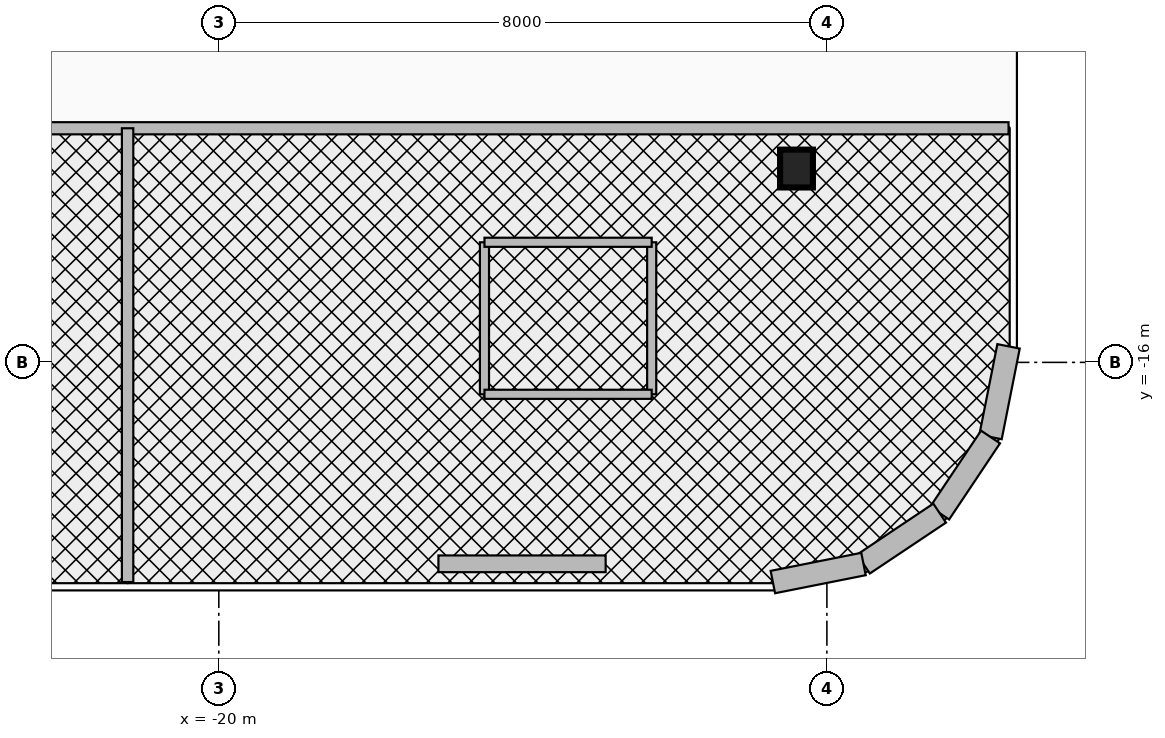
"""IFC4 building model, lengths in metres.
Left out: names, types, materials, properties, quantities, classifications, styles, units other than length and angle.
Written with IfcOpenShell. Run it as: python <this file> out.ifc"""

import sys

from ifc_helpers import new_model, si_unit, direction, frame, frame_2d, origin, origin_2d, place, context, subcontext, project, spatial, rectangle, i_section, extrude, source, transform, mapped, element, fill, save


model = new_model("IFC4")
c1 = context("Model", 3, precision=1e-05, world=origin(), true_north=direction((0.0, 1.0)))
c2 = subcontext(c1, "Body", "Model", "MODEL_VIEW")
j1 = project(units=[si_unit("LENGTHUNIT", "METRE"), si_unit("PLANEANGLEUNIT", "RADIAN")], contexts=[c1])
p1 = place(None, origin())
s1 = spatial("IfcSite", under=j1, at=p1, CompositionType="ELEMENT")
p2 = place(p1, origin())
s2 = spatial("IfcBuilding", under=s1, at=p2, CompositionType="ELEMENT")
p3 = place(p2, frame((0.0, 0.0, 26.0)))
s3 = spatial("IfcBuildingStorey", under=s2, at=p3, CompositionType="ELEMENT", Elevation=26.0)
m1 = source(origin(), c2, "Body", "SweptSolid", [
    extrude(i_section(OverallWidth=0.432, OverallDepth=0.498, WebThickness=0.056, FlangeThickness=0.089, at=origin_2d()), origin(), (0.0, 0.0, 1.0), 3.7),
])
p4 = place(p3, frame((-12.4, -13.45, 0.0), z_axis=(0.0, 0.0, 1.0), x_axis=(1.0, 0.0, 0.0)))
e1 = element("IfcColumn", 1, at=p4, inside=s3, PredefinedType="COLUMN", context=c2, shape_type="MappedRepresentation", body=[
    mapped(m1, transform((0.0, 0.0, 0.0), x_axis=(1.0, 0.0, 0.0), y_axis=(0.0, 1.0, 0.0), z_axis=(0.0, 0.0, 1.0), scale=1.0)),
])
p5 = place(p3, frame((-9.61, -15.789, 0.0), z_axis=(0.0, 0.0, 1.0), x_axis=(-0.194996050505, -0.980804027463, 0.0)))
e2 = element("IfcWall", 2, at=p5, inside=s3, PredefinedType="SOLIDWALL", context=c2, shape_type="SweptSolid", body=[
    extrude(rectangle(XDim=1.216, YDim=0.3, at=frame_2d((0.608, 0.0))), origin(), (0.0, 0.0, 1.0), 3.46),
])
for number, where, z_axis, x_axis in (
    (3, (-9.847, -16.982, 0.0), (0.0, 0.0, 1.0), (-0.556, -0.831, 0.0)),
    (4, (-10.517, -17.983, 0.0), (0.0, 0.0, 1.0), (-0.831, -0.556, 0.0)),
):
    element("IfcWall", number, at=place(p3, frame(where, z_axis=z_axis, x_axis=x_axis)), inside=s3, PredefinedType="SOLIDWALL", context=c2, shape_type="SweptSolid", body=[
        extrude(rectangle(XDim=1.205, YDim=0.3, at=frame_2d((0.603, 0.0))), origin(), (0.0, 0.0, 1.0), 3.46),
    ])
p6 = place(p3, frame((-11.518, -18.653, 0.0), z_axis=(0.0, 0.0, 1.0), x_axis=(-0.980804027463, -0.194996050505, 0.0)))
e5 = element("IfcWall", 5, at=p6, inside=s3, PredefinedType="SOLIDWALL", context=c2, shape_type="SweptSolid", body=[
    extrude(rectangle(XDim=1.216, YDim=0.3, at=frame_2d((0.608, 0.0))), origin(), (0.0, 0.0, 1.0), 3.46),
])
p7 = place(p3, frame((-14.911, -18.65, 0.0), z_axis=(0.0, 0.0, 1.0), x_axis=(-1.0, 0.0, 0.0)))
e6 = element("IfcWall", 6, at=p7, inside=s3, PredefinedType="SOLIDWALL", context=c2, shape_type="SweptSolid", body=[
    extrude(rectangle(XDim=2.2, YDim=0.22, at=frame_2d((1.1, 0.0))), origin(), (0.0, 0.0, 1.0), 3.46),
])
p8 = place(p7, frame((0.65, 0.0, 0.95)))
e7 = element("IfcOpeningElement", 7, at=p8, cuts=e6, PredefinedType="OPENING", context=c2, shape_type="SweptSolid", body=[
    extrude(rectangle(XDim=0.9, YDim=1.3, at=frame_2d((0.45, 0.65))), frame((0.0, 0.125, 0.0), z_axis=(0.0, -1.0, 0.0), x_axis=(1.0, 0.0, 0.0)), (0.0, 0.0, 1.0), 0.25),
])
p9 = place(p3, frame((-31.89, -12.92, 0.0), z_axis=(0.0, 0.0, 1.0), x_axis=(1.0, 0.0, 0.0)))
e8 = element("IfcWall", 8, at=p9, inside=s3, PredefinedType="PARTITIONING", context=c2, shape_type="SweptSolid", body=[
    extrude(rectangle(XDim=22.28, YDim=0.16, at=frame_2d((11.14, 0.0))), origin(), (0.0, 0.0, 1.0), 2.834),
])
p10 = place(p9, frame((5.97, 0.0, 0.0)))
e9 = element("IfcOpeningElement", 9, at=p10, cuts=e8, PredefinedType="OPENING", context=c2, shape_type="SweptSolid", body=[
    extrude(rectangle(XDim=0.95, YDim=2.15, at=frame_2d((0.475, 1.075))), frame((0.0, 0.095, 0.0), z_axis=(0.0, -1.0, 0.0), x_axis=(1.0, 0.0, 0.0)), (0.0, 0.0, 1.0), 0.19),
])
p11 = place(p9, frame((16.01, 0.0, 0.0)))
e10 = element("IfcOpeningElement", 10, at=p11, cuts=e8, PredefinedType="OPENING", context=c2, shape_type="SweptSolid", body=[
    extrude(rectangle(XDim=0.95, YDim=2.15, at=frame_2d((0.475, 1.075))), frame((0.0, 0.095, 0.0), z_axis=(0.0, -1.0, 0.0), x_axis=(1.0, 0.0, 0.0)), (0.0, 0.0, 1.0), 0.19),
])
p12 = place(p3, frame((-21.2, -18.89, 0.0), z_axis=(0.0, 0.0, 1.0), x_axis=(0.0, 1.0, 0.0)))
e11 = element("IfcWall", 11, at=p12, inside=s3, PredefinedType="PARTITIONING", context=c2, shape_type="SweptSolid", body=[
    extrude(rectangle(XDim=5.97, YDim=0.15, at=frame_2d((2.985, 0.0))), origin(), (0.0, 0.0, 1.0), 2.896),
])
for number, where, z_axis, x_axis in (
    (12, (-16.505, -16.42, 0.0), (0.0, 0.0, 1.0), (0.0, 1.0, 0.0)),
    (13, (-14.305, -16.42, 0.0), (0.0, 0.0, 1.0), (0.0, 1.0, 0.0)),
):
    element("IfcWall", number, at=place(p3, frame(where, z_axis=z_axis, x_axis=x_axis)), inside=s3, PredefinedType="PARTITIONING", context=c2, shape_type="SweptSolid", body=[
        extrude(rectangle(XDim=2.0, YDim=0.12, at=frame_2d((1.0, 0.0))), origin(), (0.0, 0.0, 1.0), 3.46),
    ])
p13 = place(p3, frame((-16.505, -16.42, 0.0), z_axis=(0.0, 0.0, 1.0), x_axis=(1.0, 0.0, 0.0)))
e14 = element("IfcWall", 14, at=p13, inside=s3, PredefinedType="PARTITIONING", context=c2, shape_type="SweptSolid", body=[
    extrude(rectangle(XDim=2.2, YDim=0.12, at=frame_2d((1.1, 0.0))), origin(), (0.0, 0.0, 1.0), 3.46),
])
p14 = place(p3, frame((-16.505, -14.42, 0.0), z_axis=(0.0, 0.0, 1.0), x_axis=(1.0, 0.0, 0.0)))
e15 = element("IfcWall", 15, at=p14, inside=s3, PredefinedType="PARTITIONING", context=c2, shape_type="SweptSolid", body=[
    extrude(rectangle(XDim=2.2, YDim=0.12, at=frame_2d((1.1, 0.0))), origin(), (0.0, 0.0, 1.0), 3.46),
])
p15 = place(p14, frame((0.675, 0.0, 0.0)))
e16 = element("IfcOpeningElement", 16, at=p15, cuts=e15, PredefinedType="OPENING", context=c2, shape_type="SweptSolid", body=[
    extrude(rectangle(XDim=0.85, YDim=2.1, at=frame_2d((0.425, 1.05))), frame((0.0, 0.075, 0.0), z_axis=(0.0, -1.0, 0.0), x_axis=(1.0, 0.0, 0.0)), (0.0, 0.0, 1.0), 0.15),
])
p16 = place(p8, origin())
e17 = element("IfcWindow", 17, at=p16, inside=s3, PartitioningType="SINGLE_PANEL", PredefinedType="WINDOW", context=c2, shape_type="SweptSolid", body=[
    extrude(rectangle(XDim=0.9, YDim=1.3, at=frame_2d((0.45, 0.65))), frame((0.0, 0.03, 0.0), z_axis=(0.0, -1.0, 0.0), x_axis=(1.0, 0.0, 0.0)), (0.0, 0.0, 1.0), 0.06),
])
fill(e7, e17)
p17 = place(p11, frame((0.95, 0.0, 0.0), z_axis=(0.0, 0.0, 1.0), x_axis=(-1.0, 0.0, 0.0)))
e18 = element("IfcDoor", 18, at=p17, inside=s3, OperationType="SINGLE_SWING_LEFT", PredefinedType="DOOR", context=c2, shape_type="SweptSolid", body=[
    extrude(rectangle(XDim=0.95, YDim=2.15, at=frame_2d((0.475, 1.075))), frame((0.0, 0.025, 0.0), z_axis=(0.0, -1.0, 0.0), x_axis=(1.0, 0.0, 0.0)), (0.0, 0.0, 1.0), 0.05),
])
fill(e10, e18)
p18 = place(p15, origin())
e19 = element("IfcDoor", 19, at=p18, inside=s3, OperationType="SINGLE_SWING_RIGHT", PredefinedType="DOOR", context=c2, shape_type="SweptSolid", body=[
    extrude(rectangle(XDim=0.85, YDim=2.1, at=frame_2d((0.425, 1.05))), frame((0.0, 0.025, 0.0), z_axis=(0.0, -1.0, 0.0), x_axis=(1.0, 0.0, 0.0)), (0.0, 0.0, 1.0), 0.05),
])
fill(e16, e19)
save(model, sys.argv[1])
